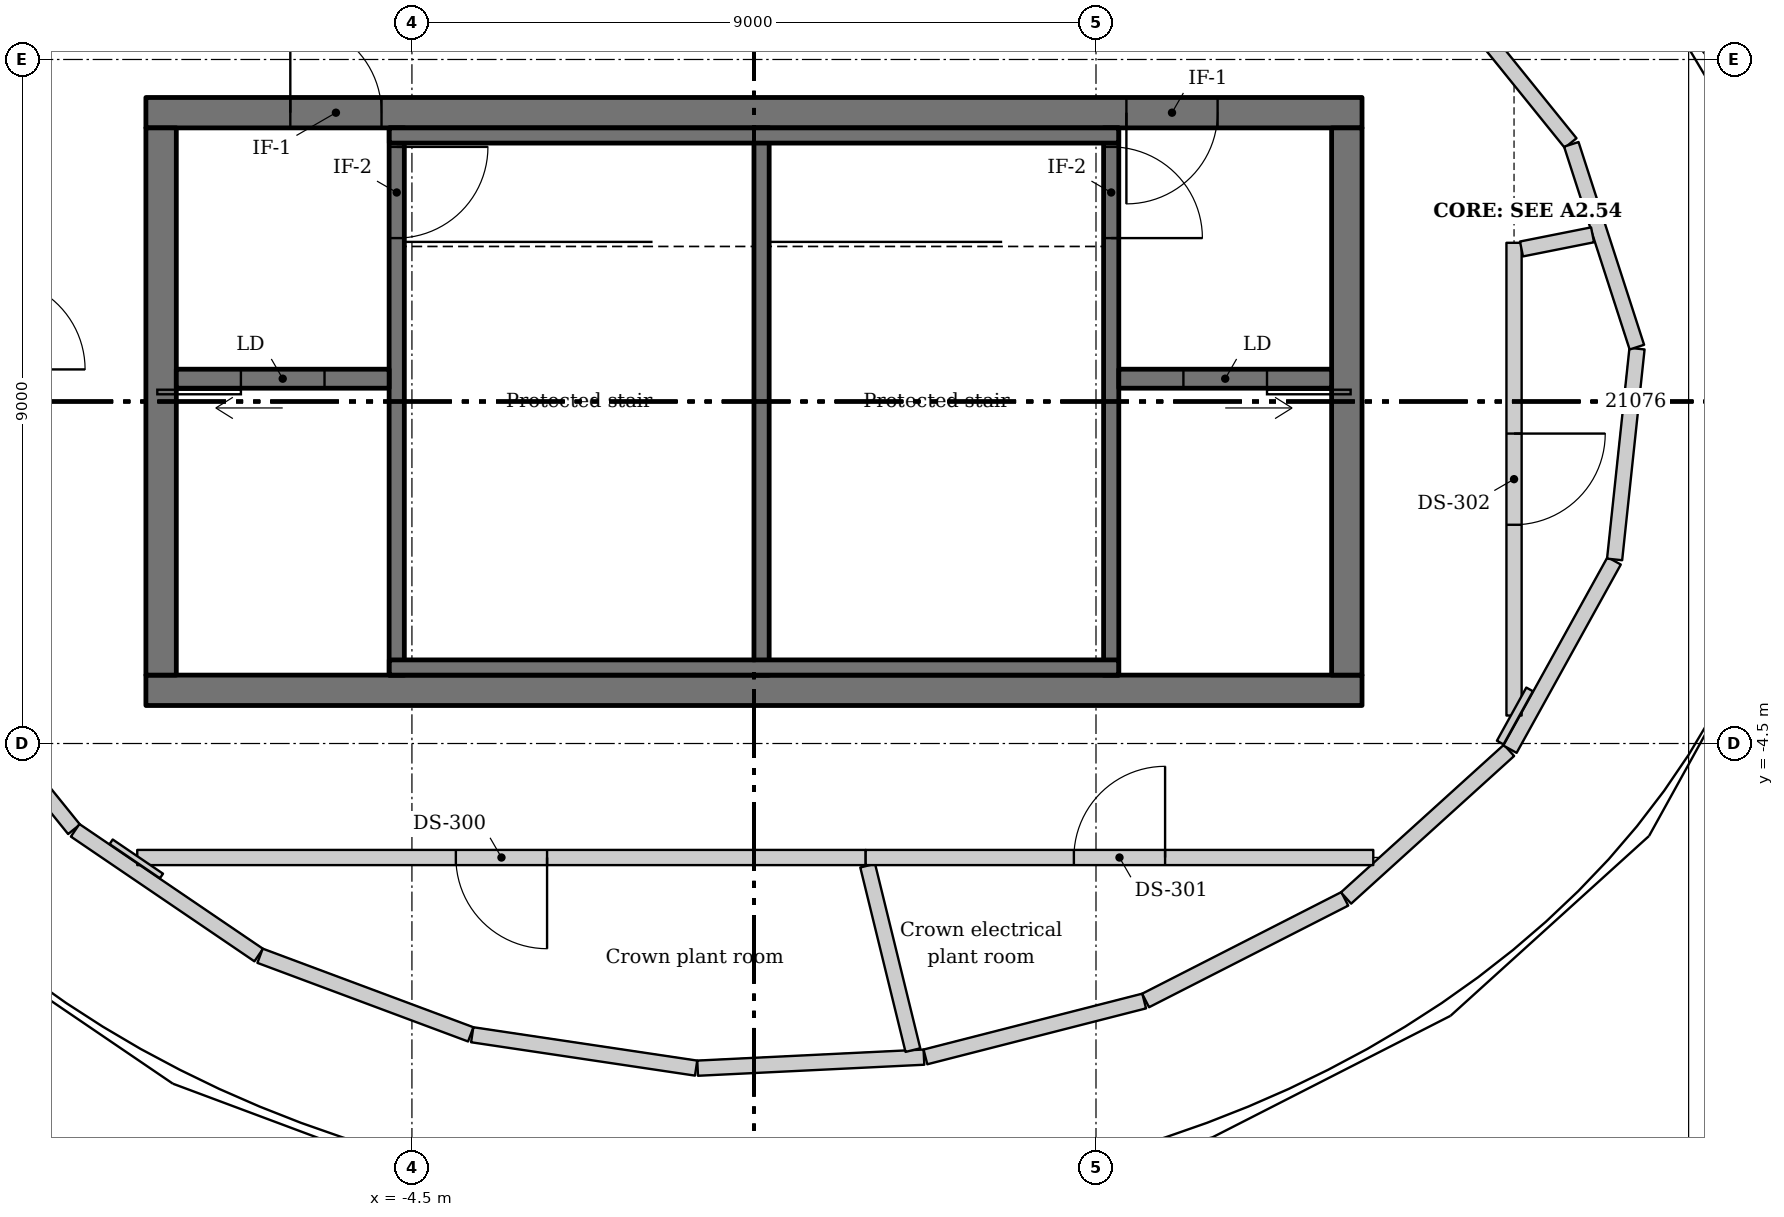
"""IFC4 building model, lengths in metres.
Left out: names, types, materials, properties, quantities, classifications, styles, units other than length and angle.
Written with IfcOpenShell. Run it as: python <this file> out.ifc"""

import sys

from ifc_helpers import new_model, si_unit, direction, frame, frame_2d, origin, place, context, subcontext, project, spatial, rectangle, extrude, source, transform, mapped, element, fill, save


model = new_model("IFC4")
c1 = context("Model", 3, precision=1e-05, world=origin(), true_north=direction((0.0, 1.0)))
c2 = subcontext(c1, "Body", "Model", "MODEL_VIEW")
j1 = project(units=[si_unit("LENGTHUNIT", "METRE"), si_unit("PLANEANGLEUNIT", "RADIAN")], contexts=[c1])
p1 = place(None, origin())
s1 = spatial("IfcSite", under=j1, at=p1, CompositionType="ELEMENT")
p2 = place(p1, origin())
s2 = spatial("IfcBuilding", under=s1, at=p2, CompositionType="ELEMENT")
p3 = place(p2, frame((0.0, 0.0, 370.0)))
s3 = spatial("IfcBuildingStorey", under=s2, at=p3, CompositionType="ELEMENT", Elevation=370.0)
m1 = source(origin(), c2, "Body", "SweptSolid", [
    extrude(rectangle(XDim=16.0, YDim=0.4, at=frame_2d((8.0, 0.0))), origin(), (0.0, 0.0, 1.0), 4.45),
])
p4 = place(p3, frame((-8.0, 3.8, -0.25), z_axis=(0.0, 0.0, 1.0), x_axis=(1.0, 0.0, 0.0)))
e1 = element("IfcWall", 1, at=p4, inside=s3, PredefinedType="SHEAR", context=c2, shape_type="MappedRepresentation", body=[
    mapped(m1, transform((0.0, 0.0, 0.0))),
])
m2 = source(origin(), c2, "Body", "SweptSolid", [
    extrude(rectangle(XDim=1.2, YDim=2.1, at=frame_2d((0.6, 1.05))), frame((0.0, 0.21, 0.0), z_axis=(0.0, -1.0, 0.0), x_axis=(1.0, 0.0, 0.0)), (0.0, 0.0, 1.0), 0.42),
])
p5 = place(p4, frame((12.9, 0.0, 0.25)))
e2 = element("IfcOpeningElement", 2, at=p5, cuts=e1, PredefinedType="OPENING", context=c2, shape_type="MappedRepresentation", body=[
    mapped(m2, transform((0.0, 0.0, 0.0))),
])
p6 = place(p4, frame((1.9, 0.0, 0.25)))
e3 = element("IfcOpeningElement", 3, at=p6, cuts=e1, PredefinedType="OPENING", context=c2, shape_type="MappedRepresentation", body=[
    mapped(m2, transform((0.0, 0.0, 0.0))),
])
p7 = place(p3, frame((-8.0, -3.8, -0.25), z_axis=(0.0, 0.0, 1.0), x_axis=(1.0, 0.0, 0.0)))
e4 = element("IfcWall", 4, at=p7, inside=s3, PredefinedType="SHEAR", context=c2, shape_type="MappedRepresentation", body=[
    mapped(m1, transform((0.0, 0.0, 0.0))),
])
m3 = source(origin(), c2, "Body", "SweptSolid", [
    extrude(rectangle(XDim=7.2, YDim=0.4, at=frame_2d((3.6, 0.0))), origin(), (0.0, 0.0, 1.0), 4.45),
])
for number, where, z_axis, x_axis in (
    (5, (7.8, -3.6, -0.25), (0.0, 0.0, 1.0), (0.0, 1.0, 0.0)),
    (6, (-7.8, -3.6, -0.25), (0.0, 0.0, 1.0), (0.0, 1.0, 0.0)),
):
    element("IfcWall", number, at=place(p3, frame(where, z_axis=z_axis, x_axis=x_axis)), inside=s3, PredefinedType="SHEAR", context=c2, shape_type="MappedRepresentation", body=[
        mapped(m3, transform((0.0, 0.0, 0.0))),
    ])
m4 = source(origin(), c2, "Body", "SweptSolid", [
    extrude(rectangle(XDim=2.863, YDim=0.2, at=frame_2d((1.432, 0.0))), origin(), (0.0, 0.0, 1.0), 4.2),
])
p8 = place(p3, frame((8.945, 5.629, 0.0), z_axis=(0.0, 0.0, 1.0), x_axis=(0.628223975098, -0.77803254245, 0.0)))
e7 = element("IfcWall", 7, at=p8, inside=s3, PredefinedType="SOLIDWALL", context=c2, shape_type="MappedRepresentation", body=[
    mapped(m4, transform((0.0, 0.0, 0.0))),
])
m5 = source(origin(), c2, "Body", "SweptSolid", [
    extrude(rectangle(XDim=2.894, YDim=0.2, at=frame_2d((1.447, 0.0))), origin(), (0.0, 0.0, 1.0), 4.2),
])
p9 = place(p3, frame((-9.934, 4.59, 0.0), z_axis=(0.0, 0.0, 1.0), x_axis=(0.741091893943, 0.671403607923, 0.0)))
e8 = element("IfcWall", 8, at=p9, inside=s3, PredefinedType="SOLIDWALL", context=c2, shape_type="MappedRepresentation", body=[
    mapped(m5, transform((0.0, 0.0, 0.0))),
])
p10 = place(p3, frame((-8.945, -5.629, 0.0), z_axis=(0.0, 0.0, 1.0), x_axis=(-0.628223975098, 0.77803254245, 0.0)))
e9 = element("IfcWall", 9, at=p10, inside=s3, PredefinedType="SOLIDWALL", context=c2, shape_type="MappedRepresentation", body=[
    mapped(m4, transform((0.0, 0.0, 0.0))),
])
m6 = source(origin(), c2, "Body", "SweptSolid", [
    extrude(rectangle(XDim=2.92, YDim=0.2, at=frame_2d((1.46, 0.0))), origin(), (0.0, 0.0, 1.0), 4.2),
])
p11 = place(p3, frame((-6.516, -7.284, 0.0), z_axis=(0.0, 0.0, 1.0), x_axis=(-0.827026010812, 0.562163657168, 0.0)))
e10 = element("IfcWall", 10, at=p11, inside=s3, PredefinedType="SOLIDWALL", context=c2, shape_type="MappedRepresentation", body=[
    mapped(m6, transform((0.0, 0.0, 0.0))),
])
m7 = source(origin(), c2, "Body", "SweptSolid", [
    extrude(rectangle(XDim=2.958, YDim=0.2, at=frame_2d((1.479, 0.0))), origin(), (0.0, 0.0, 1.0), 4.2),
])
p12 = place(p3, frame((-3.726, -8.327, 0.0), z_axis=(0.0, 0.0, 1.0), x_axis=(-0.936917921025, 0.349549437508, 0.0)))
e11 = element("IfcWall", 11, at=p12, inside=s3, PredefinedType="SOLIDWALL", context=c2, shape_type="MappedRepresentation", body=[
    mapped(m7, transform((0.0, 0.0, 0.0))),
])
m8 = source(origin(), c2, "Body", "SweptSolid", [
    extrude(rectangle(XDim=2.978, YDim=0.2, at=frame_2d((1.489, 0.0))), origin(), (0.0, 0.0, 1.0), 4.2),
])
p13 = place(p3, frame((-0.761, -8.771, 0.0), z_axis=(0.0, 0.0, 1.0), x_axis=(-0.989067040899, 0.147466567759, 0.0)))
e12 = element("IfcWall", 12, at=p13, inside=s3, PredefinedType="SOLIDWALL", context=c2, shape_type="MappedRepresentation", body=[
    mapped(m8, transform((0.0, 0.0, 0.0))),
])
m9 = source(origin(), c2, "Body", "SweptSolid", [
    extrude(rectangle(XDim=2.981, YDim=0.2, at=frame_2d((1.491, 0.0))), origin(), (0.0, 0.0, 1.0), 4.2),
])
p14 = place(p3, frame((2.236, -8.627, 0.0), z_axis=(0.0, 0.0, 1.0), x_axis=(-0.998812059487, -0.048728531928, 0.0)))
e13 = element("IfcWall", 13, at=p14, inside=s3, PredefinedType="SOLIDWALL", context=c2, shape_type="MappedRepresentation", body=[
    mapped(m9, transform((0.0, 0.0, 0.0))),
])
m10 = source(origin(), c2, "Body", "SweptSolid", [
    extrude(rectangle(XDim=2.97, YDim=0.2, at=frame_2d((1.485, 0.0))), origin(), (0.0, 0.0, 1.0), 4.2),
])
p15 = place(p3, frame((5.134, -7.888, 0.0), z_axis=(0.0, 0.0, 1.0), x_axis=(-0.968872424501, -0.247560548235, 0.0)))
e14 = element("IfcWall", 14, at=p15, inside=s3, PredefinedType="SOLIDWALL", context=c2, shape_type="MappedRepresentation", body=[
    mapped(m10, transform((0.0, 0.0, 0.0))),
])
m11 = source(origin(), c2, "Body", "SweptSolid", [
    extrude(rectangle(XDim=2.942, YDim=0.2, at=frame_2d((1.471, 0.0))), origin(), (0.0, 0.0, 1.0), 4.2),
])
p16 = place(p3, frame((7.773, -6.544, 0.0), z_axis=(0.0, 0.0, 1.0), x_axis=(-0.890779694992, -0.454435402439, 0.0)))
e15 = element("IfcWall", 15, at=p16, inside=s3, PredefinedType="SOLIDWALL", context=c2, shape_type="MappedRepresentation", body=[
    mapped(m11, transform((0.0, 0.0, 0.0))),
])
p17 = place(p3, frame((9.934, -4.59, 0.0), z_axis=(0.0, 0.0, 1.0), x_axis=(-0.741091893943, -0.671403607923, 0.0)))
e16 = element("IfcWall", 16, at=p17, inside=s3, PredefinedType="SOLIDWALL", context=c2, shape_type="MappedRepresentation", body=[
    mapped(m5, transform((0.0, 0.0, 0.0))),
])
m12 = source(origin(), c2, "Body", "SweptSolid", [
    extrude(rectangle(XDim=2.832, YDim=0.2, at=frame_2d((1.416, 0.0))), origin(), (0.0, 0.0, 1.0), 4.2),
])
p18 = place(p3, frame((11.317, -2.097, 0.0), z_axis=(0.0, 0.0, 1.0), x_axis=(-0.484068407446, -0.875030157716, 0.0)))
e17 = element("IfcWall", 17, at=p18, inside=s3, PredefinedType="SOLIDWALL", context=c2, shape_type="MappedRepresentation", body=[
    mapped(m12, transform((0.0, 0.0, 0.0))),
])
m13 = source(origin(), c2, "Body", "SweptSolid", [
    extrude(rectangle(XDim=2.789, YDim=0.2, at=frame_2d((1.395, 0.0))), origin(), (0.0, 0.0, 1.0), 4.2),
])
p19 = place(p3, frame((11.618, 0.696, 0.0), z_axis=(0.0, 0.0, 1.0), x_axis=(-0.105819200095, -0.994385386503, 0.0)))
e18 = element("IfcWall", 18, at=p19, inside=s3, PredefinedType="SOLIDWALL", context=c2, shape_type="MappedRepresentation", body=[
    mapped(m13, transform((0.0, 0.0, 0.0))),
])
m14 = source(origin(), c2, "Body", "SweptSolid", [
    extrude(rectangle(XDim=2.804, YDim=0.2, at=frame_2d((1.402, 0.0))), origin(), (0.0, 0.0, 1.0), 4.2),
])
p20 = place(p3, frame((10.754, 3.384, 0.0), z_axis=(0.0, 0.0, 1.0), x_axis=(0.30756994526, -0.951525474579, 0.0)))
e19 = element("IfcWall", 19, at=p20, inside=s3, PredefinedType="SOLIDWALL", context=c2, shape_type="MappedRepresentation", body=[
    mapped(m14, transform((0.0, 0.0, 0.0))),
])
m15 = source(origin(), c2, "Body", "SweptSolid", [
    extrude(rectangle(XDim=7.2, YDim=0.2, at=frame_2d((3.6, 0.0))), origin(), (0.0, 0.0, 1.0), 4.2),
])
p21 = place(p3, frame((0.1, 3.6, 0.0), z_axis=(0.0, 0.0, 1.0), x_axis=(0.0, -1.0, 0.0)))
e20 = element("IfcWall", 20, at=p21, inside=s3, PredefinedType="SHEAR", context=c2, shape_type="MappedRepresentation", body=[
    mapped(m15, transform((0.0, 0.0, 0.0))),
])
p22 = place(p3, frame((4.7, -3.6, 0.0), z_axis=(0.0, 0.0, 1.0), x_axis=(0.0, 1.0, 0.0)))
e21 = element("IfcWall", 21, at=p22, inside=s3, PredefinedType="SHEAR", context=c2, shape_type="MappedRepresentation", body=[
    mapped(m15, transform((0.0, 0.0, 0.0))),
])
m16 = source(origin(), c2, "Body", "SweptSolid", [
    extrude(rectangle(XDim=1.2, YDim=2.1, at=frame_2d((0.6, 1.05))), frame((0.0, 0.11, 0.0), z_axis=(0.0, -1.0, 0.0), x_axis=(1.0, 0.0, 0.0)), (0.0, 0.0, 1.0), 0.22),
])
p23 = place(p22, frame((5.75, 0.0, 0.0)))
e22 = element("IfcOpeningElement", 22, at=p23, cuts=e21, PredefinedType="OPENING", context=c2, shape_type="MappedRepresentation", body=[
    mapped(m16, transform((0.0, 0.0, 0.0))),
])
p24 = place(p3, frame((-4.7, 3.6, 0.0), z_axis=(0.0, 0.0, 1.0), x_axis=(0.0, -1.0, 0.0)))
e23 = element("IfcWall", 23, at=p24, inside=s3, PredefinedType="SHEAR", context=c2, shape_type="MappedRepresentation", body=[
    mapped(m15, transform((0.0, 0.0, 0.0))),
])
p25 = place(p24, frame((0.25, 0.0, 0.0)))
e24 = element("IfcOpeningElement", 24, at=p25, cuts=e23, PredefinedType="OPENING", context=c2, shape_type="MappedRepresentation", body=[
    mapped(m16, transform((0.0, 0.0, 0.0))),
])
m17 = source(origin(), c2, "Body", "SweptSolid", [
    extrude(rectangle(XDim=2.8, YDim=0.25, at=frame_2d((1.4, 0.0))), origin(), (0.0, 0.0, 1.0), 4.2),
])
p26 = place(p3, frame((7.6, 0.3, 0.0), z_axis=(0.0, 0.0, 1.0), x_axis=(-1.0, 0.0, 0.0)))
e25 = element("IfcWall", 25, at=p26, inside=s3, PredefinedType="SHEAR", context=c2, shape_type="MappedRepresentation", body=[
    mapped(m17, transform((0.0, 0.0, 0.0))),
])
m18 = source(origin(), c2, "Body", "SweptSolid", [
    extrude(rectangle(XDim=1.1, YDim=2.1, at=frame_2d((0.55, 1.05))), frame((0.0, 0.135, 0.0), z_axis=(0.0, -1.0, 0.0), x_axis=(1.0, 0.0, 0.0)), (0.0, 0.0, 1.0), 0.27),
])
p27 = place(p26, frame((0.85, 0.0, 0.0)))
e26 = element("IfcOpeningElement", 26, at=p27, cuts=e25, PredefinedType="OPENING", context=c2, shape_type="MappedRepresentation", body=[
    mapped(m18, transform((0.0, 0.0, 0.0))),
])
p28 = place(p3, frame((-4.8, 0.3, 0.0), z_axis=(0.0, 0.0, 1.0), x_axis=(-1.0, 0.0, 0.0)))
e27 = element("IfcWall", 27, at=p28, inside=s3, PredefinedType="SHEAR", context=c2, shape_type="MappedRepresentation", body=[
    mapped(m17, transform((0.0, 0.0, 0.0))),
])
p29 = place(p28, frame((0.85, 0.0, 0.0)))
e28 = element("IfcOpeningElement", 28, at=p29, cuts=e27, PredefinedType="OPENING", context=c2, shape_type="MappedRepresentation", body=[
    mapped(m18, transform((0.0, 0.0, 0.0))),
])
m19 = source(origin(), c2, "Body", "SweptSolid", [
    extrude(rectangle(XDim=9.596, YDim=0.2, at=frame_2d((4.798, 0.0))), origin(), (0.0, 0.0, 1.0), 4.2),
])
for number, where, z_axis, x_axis in (
    (29, (-4.798, -3.5, 0.0), (0.0, 0.0, 1.0), (1.0, 0.0, 0.0)),
    (30, (4.798, 3.5, 0.0), (0.0, 0.0, 1.0), (-1.0, 0.0, 0.0)),
):
    element("IfcWall", number, at=place(p3, frame(where, z_axis=z_axis, x_axis=x_axis)), inside=s3, PredefinedType="SHEAR", context=c2, shape_type="MappedRepresentation", body=[
        mapped(m19, transform((0.0, 0.0, 0.0))),
    ])
m20 = source(origin(), c2, "Body", "SweptSolid", [
    extrude(rectangle(XDim=9.584, YDim=0.2, at=frame_2d((4.792, 0.0))), origin(), (0.0, 0.0, 1.0), 4.2),
])
p30 = place(p3, frame((1.47, -6.0, 0.0), z_axis=(0.0, 0.0, 1.0), x_axis=(-1.0, 0.0, 0.0)))
e31 = element("IfcWall", 31, at=p30, inside=s3, PredefinedType="PARTITIONING", context=c2, shape_type="MappedRepresentation", body=[
    mapped(m20, transform((0.0, 0.0, 0.0))),
])
p31 = place(p30, frame((4.192, 0.0, 0.0)))
e32 = element("IfcOpeningElement", 32, at=p31, cuts=e31, PredefinedType="OPENING", context=c2, shape_type="MappedRepresentation", body=[
    mapped(m16, transform((0.0, 0.0, 0.0))),
])
m21 = source(origin(), c2, "Body", "SweptSolid", [
    extrude(rectangle(XDim=2.499, YDim=0.2, at=frame_2d((1.25, 0.0))), origin(), (0.0, 0.0, 1.0), 4.2),
])
p32 = place(p3, frame((1.496, -6.107, 0.0), z_axis=(0.0, 0.0, 1.0), x_axis=(0.238096332587, -0.971241543803, 0.0)))
e33 = element("IfcWall", 33, at=p32, inside=s3, PredefinedType="PARTITIONING", context=c2, shape_type="MappedRepresentation", body=[
    mapped(m21, transform((0.0, 0.0, 0.0))),
])
m22 = source(origin(), c2, "Body", "SweptSolid", [
    extrude(rectangle(XDim=6.678, YDim=0.2, at=frame_2d((3.339, 0.0))), origin(), (0.0, 0.0, 1.0), 4.2),
])
p33 = place(p3, frame((8.148, -6.0, 0.0), z_axis=(0.0, 0.0, 1.0), x_axis=(-1.0, 0.0, 0.0)))
e34 = element("IfcWall", 34, at=p33, inside=s3, PredefinedType="PARTITIONING", context=c2, shape_type="MappedRepresentation", body=[
    mapped(m22, transform((0.0, 0.0, 0.0))),
])
p34 = place(p33, frame((2.739, 0.0, 0.0)))
e35 = element("IfcOpeningElement", 35, at=p34, cuts=e34, PredefinedType="OPENING", context=c2, shape_type="MappedRepresentation", body=[
    mapped(m16, transform((0.0, 0.0, 0.0))),
])
m23 = source(origin(), c2, "Body", "SweptSolid", [
    extrude(rectangle(XDim=6.22, YDim=0.2, at=frame_2d((3.11, 0.0))), origin(), (0.0, 0.0, 1.0), 4.2),
])
p35 = place(p3, frame((10.0, 2.088, 0.0), z_axis=(0.0, 0.0, 1.0), x_axis=(0.0, -1.0, 0.0)))
e36 = element("IfcWall", 36, at=p35, inside=s3, PredefinedType="PARTITIONING", context=c2, shape_type="MappedRepresentation", body=[
    mapped(m23, transform((0.0, 0.0, 0.0))),
])
p36 = place(p35, frame((2.51, 0.0, 0.0)))
e37 = element("IfcOpeningElement", 37, at=p36, cuts=e36, PredefinedType="OPENING", context=c2, shape_type="MappedRepresentation", body=[
    mapped(m16, transform((0.0, 0.0, 0.0))),
])
m24 = source(origin(), c2, "Body", "SweptSolid", [
    extrude(rectangle(XDim=0.953, YDim=0.2, at=frame_2d((0.477, 0.0))), origin(), (0.0, 0.0, 1.0), 4.2),
])
p37 = place(p3, frame((10.098, 2.007, 0.0), z_axis=(0.0, 0.0, 1.0), x_axis=(0.980777163818, 0.19513112241, 0.0)))
e38 = element("IfcWall", 38, at=p37, inside=s3, PredefinedType="PARTITIONING", context=c2, shape_type="MappedRepresentation", body=[
    mapped(m24, transform((0.0, 0.0, 0.0))),
])
m25 = source(origin(), c2, "Body", "SweptSolid", [
    extrude(rectangle(XDim=0.801, YDim=0.073, at=frame_2d((0.4, 0.0))), origin(), (0.0, 0.0, 1.0), 4.2),
])
p38 = place(p3, frame((-7.795, -6.243, 0.0), z_axis=(0.0, 0.0, 1.0), x_axis=(-0.827090966084, 0.562068086465, 0.0)))
e39 = element("IfcWall", 39, at=p38, inside=s3, PredefinedType="PARTITIONING", context=c2, shape_type="MappedRepresentation", body=[
    mapped(m25, transform((0.0, 0.0, 0.0))),
])
m26 = source(origin(), c2, "Body", "SweptSolid", [
    extrude(rectangle(XDim=0.8, YDim=0.1, at=frame_2d((0.4, 0.0))), origin(), (0.0, 0.0, 1.0), 4.2),
])
p39 = place(p3, frame((10.205, -3.788, 0.0), z_axis=(0.0, 0.0, 1.0), x_axis=(-0.483827639596, -0.875163307711, 0.0)))
e40 = element("IfcWall", 40, at=p39, inside=s3, PredefinedType="PARTITIONING", context=c2, shape_type="MappedRepresentation", body=[
    mapped(m26, transform((0.0, 0.0, 0.0))),
])
m27 = source(origin(), c2, "Body", "SweptSolid", [
    extrude(rectangle(XDim=1.1, YDim=2.1, at=frame_2d((0.55, 1.05))), frame((0.0, 0.025, 0.0), z_axis=(0.0, -1.0, 0.0), x_axis=(1.0, 0.0, 0.0)), (0.0, 0.0, 1.0), 0.05),
])
p40 = place(p27, origin())
e41 = element("IfcDoor", 41, at=p40, inside=s3, OperationType="SLIDING_TO_LEFT", PredefinedType="DOOR", context=c2, shape_type="MappedRepresentation", body=[
    mapped(m27, transform((0.0, 0.0, 0.0))),
])
fill(e26, e41)
m28 = source(origin(), c2, "Body", "SweptSolid", [
    extrude(rectangle(XDim=1.2, YDim=2.1, at=frame_2d((0.6, 1.05))), frame((0.0, 0.025, 0.0), z_axis=(0.0, -1.0, 0.0), x_axis=(1.0, 0.0, 0.0)), (0.0, 0.0, 1.0), 0.05),
])
p41 = place(p23, origin())
e42 = element("IfcDoor", 42, at=p41, inside=s3, OperationType="SINGLE_SWING_RIGHT", PredefinedType="DOOR", context=c2, shape_type="MappedRepresentation", body=[
    mapped(m28, transform((0.0, 0.0, 0.0))),
])
fill(e22, e42)
p42 = place(p29, origin())
e43 = element("IfcDoor", 43, at=p42, inside=s3, OperationType="SLIDING_TO_RIGHT", PredefinedType="DOOR", context=c2, shape_type="MappedRepresentation", body=[
    mapped(m27, transform((0.0, 0.0, 0.0))),
])
fill(e28, e43)
p43 = place(p25, origin())
e44 = element("IfcDoor", 44, at=p43, inside=s3, OperationType="SINGLE_SWING_LEFT", PredefinedType="DOOR", context=c2, shape_type="MappedRepresentation", body=[
    mapped(m28, transform((0.0, 0.0, 0.0))),
])
fill(e24, e44)
p44 = place(p5, origin())
e45 = element("IfcDoor", 45, at=p44, inside=s3, OperationType="SINGLE_SWING_LEFT", PredefinedType="DOOR", context=c2, shape_type="MappedRepresentation", body=[
    mapped(m28, transform((0.0, 0.0, 0.0))),
])
fill(e2, e45)
p45 = place(p6, origin())
e46 = element("IfcDoor", 46, at=p45, inside=s3, OperationType="SINGLE_SWING_LEFT", PredefinedType="DOOR", context=c2, shape_type="MappedRepresentation", body=[
    mapped(m28, transform((0.0, 0.0, 0.0))),
])
fill(e3, e46)
m29 = source(origin(), c2, "Body", "SweptSolid", [
    extrude(rectangle(XDim=1.2, YDim=2.1, at=frame_2d((0.6, 1.05))), frame((0.0, 0.025, 0.0), z_axis=(0.0, -1.0, 0.0), x_axis=(1.0, 0.0, 0.0)), (0.0, 0.0, 1.0), 0.05),
])
p46 = place(p31, origin())
e47 = element("IfcDoor", 47, at=p46, inside=s3, OperationType="SINGLE_SWING_LEFT", PredefinedType="DOOR", context=c2, shape_type="MappedRepresentation", body=[
    mapped(m29, transform((0.0, 0.0, 0.0))),
])
fill(e32, e47)
p47 = place(p34, origin())
e48 = element("IfcDoor", 48, at=p47, inside=s3, OperationType="SINGLE_SWING_LEFT", PredefinedType="DOOR", context=c2, shape_type="MappedRepresentation", body=[
    mapped(m29, transform((0.0, 0.0, 0.0))),
])
fill(e35, e48)
p48 = place(p36, origin())
e49 = element("IfcDoor", 49, at=p48, inside=s3, OperationType="SINGLE_SWING_LEFT", PredefinedType="DOOR", context=c2, shape_type="MappedRepresentation", body=[
    mapped(m29, transform((0.0, 0.0, 0.0))),
])
fill(e37, e49)
save(model, sys.argv[1])
